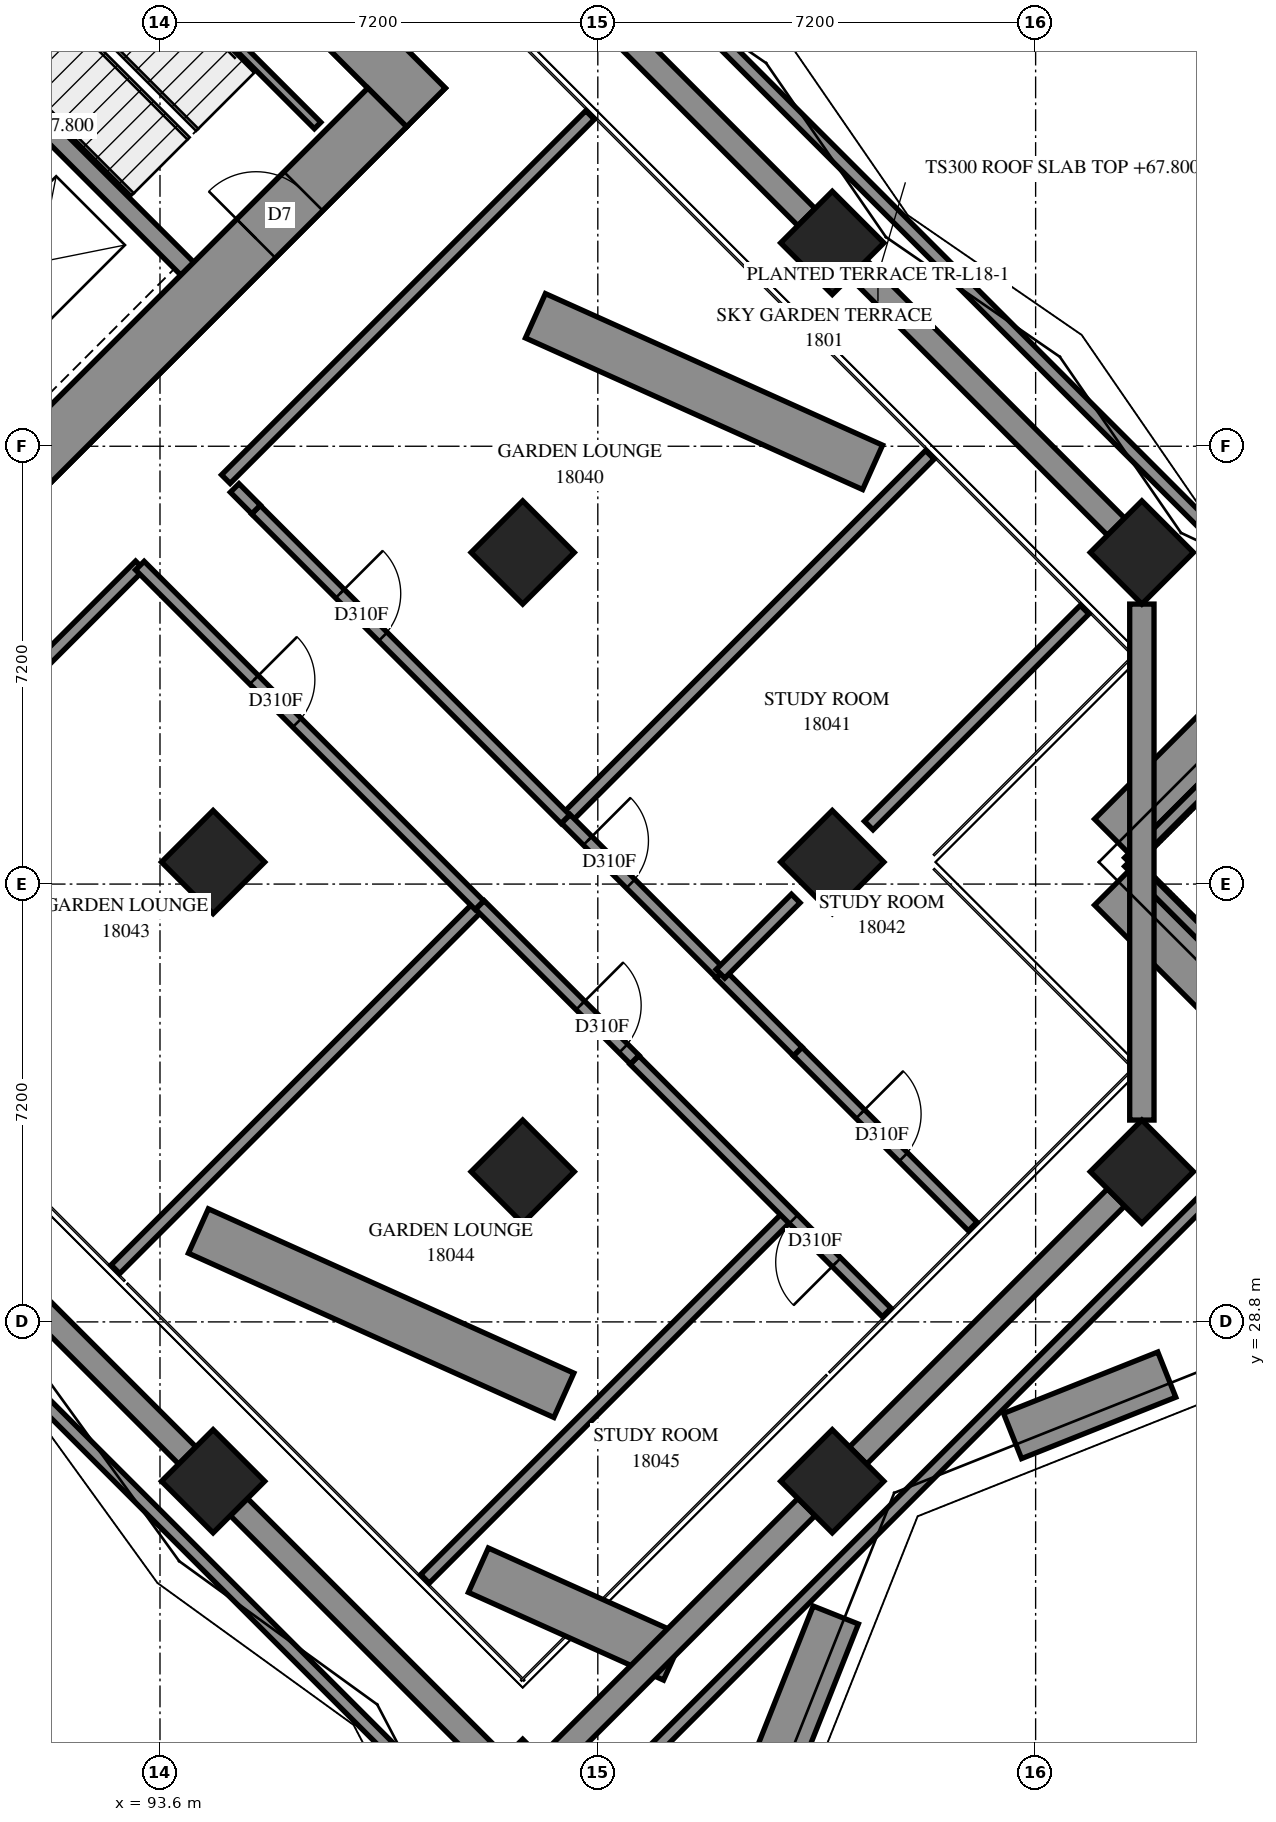
"""IFC4 building model, lengths in metres.
Left out: names, types, materials, properties, quantities, classifications, styles, units other than length and angle.
Written with IfcOpenShell. Run it as: python <this file> out.ifc"""

import sys

from ifc_helpers import new_model, si_unit, direction, frame, frame_2d, origin, origin_2d, place, context, subcontext, project, spatial, polyline, rectangle, outline, extrude, element, fill, save


model = new_model("IFC4")
c1 = context("Model", 3, precision=1e-05, world=origin(), true_north=direction((0.0, 1.0)))
c2 = subcontext(c1, "Body", "Model", "MODEL_VIEW")
j1 = project(units=[si_unit("LENGTHUNIT", "METRE"), si_unit("PLANEANGLEUNIT", "RADIAN")], contexts=[c1])
p1 = place(None, origin())
s1 = spatial("IfcSite", under=j1, at=p1, CompositionType="ELEMENT")
p2 = place(p1, origin())
s2 = spatial("IfcBuilding", under=s1, at=p2, CompositionType="ELEMENT")
p3 = place(p2, frame((0.0, 0.0, 67.8)))
s3 = spatial("IfcBuildingStorey", under=s2, at=p3, CompositionType="ELEMENT", Elevation=67.8)
for number, where, z_axis, x_axis in (
    (1, (104.656, 46.544, 0.0), (0.0, 0.0, 1.0), (0.707, -0.707, 0.0)),
    (2, (99.565, 41.453, 0.0), (0.0, 0.0, 1.0), (0.707, -0.707, 0.0)),
    (3, (94.474, 36.362, 0.0), (0.0, 0.0, 1.0), (0.707, -0.707, 0.0)),
    (4, (109.747, 41.453, 0.0), (0.0, 0.0, 1.0), (0.707, -0.707, 0.0)),
    (5, (104.656, 36.362, 0.0), (0.0, 0.0, 1.0), (0.707, -0.707, 0.0)),
    (6, (99.565, 31.271, 0.0), (0.0, 0.0, 1.0), (0.707, -0.707, 0.0)),
    (7, (94.474, 26.18, 0.0), (0.0, 0.0, 1.0), (0.707, -0.707, 0.0)),
    (8, (109.747, 31.271, 0.0), (0.0, 0.0, 1.0), (0.707, -0.707, 0.0)),
    (9, (104.656, 26.18, 0.0), (0.0, 0.0, 1.0), (0.707, -0.707, 0.0)),
    (10, (99.565, 21.088, 0.0), (0.0, 0.0, 1.0), (0.707, -0.707, 0.0)),
):
    element("IfcColumn", number, at=place(p3, frame(where, z_axis=z_axis, x_axis=x_axis)), inside=s3, PredefinedType="COLUMN", context=c2, shape_type="SweptSolid", body=[
        extrude(rectangle(XDim=1.2, YDim=1.2, at=origin_2d()), origin(), (0.0, 0.0, 1.0), 3.9),
    ])
p4 = place(p3, frame((86.519, 60.227, -0.3), z_axis=(0.0, 0.0, 1.0), x_axis=(0.7071036948, -0.7071098676, 0.0)))
e11 = element("IfcWall", 11, at=p4, inside=s3, PredefinedType="SHEAR", context=c2, shape_type="SweptSolid", body=[
    extrude(rectangle(XDim=16.2, YDim=0.9, at=frame_2d((8.1, 0.0))), origin(), (0.0, 0.0, 1.0), 3.5),
])
p5 = place(p4, frame((10.9, 0.0, 0.3)))
e12 = element("IfcOpeningElement", 12, at=p5, cuts=e11, PredefinedType="OPENING", context=c2, shape_type="SweptSolid", body=[
    extrude(rectangle(XDim=0.8, YDim=2.1, at=frame_2d((0.4, 1.05))), frame((0.0, 0.46, 0.0), z_axis=(0.0, -1.0, 0.0), x_axis=(1.0, 0.0, 0.0)), (0.0, 0.0, 1.0), 0.92),
])
p6 = place(p3, frame((87.155, 38.589, -0.3), z_axis=(0.0, 0.0, 1.0), x_axis=(0.7071067812, 0.7071067812, 0.0)))
e13 = element("IfcWall", 13, at=p6, inside=s3, PredefinedType="SHEAR", context=c2, shape_type="SweptSolid", body=[
    extrude(rectangle(XDim=14.4, YDim=0.9, at=frame_2d((7.2, 0.0))), origin(), (0.0, 0.0, 1.0), 3.5),
])
p7 = place(p6, frame((4.55, 0.0, 0.3)))
e14 = element("IfcOpeningElement", 14, at=p7, cuts=e13, PredefinedType="OPENING", context=c2, shape_type="SweptSolid", body=[
    extrude(rectangle(XDim=1.1, YDim=2.1, at=frame_2d((0.55, 1.05))), frame((0.0, 0.46, 0.0), z_axis=(0.0, -1.0, 0.0), x_axis=(1.0, 0.0, 0.0)), (0.0, 0.0, 1.0), 0.92),
])
p8 = place(p6, frame((11.35, 0.0, 0.3)))
e15 = element("IfcOpeningElement", 15, at=p8, cuts=e13, PredefinedType="OPENING", context=c2, shape_type="SweptSolid", body=[
    extrude(rectangle(XDim=1.1, YDim=2.1, at=frame_2d((0.55, 1.05))), frame((0.0, 0.46, 0.0), z_axis=(0.0, -1.0, 0.0), x_axis=(1.0, 0.0, 0.0)), (0.0, 0.0, 1.0), 0.92),
])
p9 = place(p3, frame((88.958, 51.211, 0.0), z_axis=(0.0, 0.0, 1.0), x_axis=(0.7070998367, -0.7071137256, 0.0)))
e16 = element("IfcWall", 16, at=p9, inside=s3, PredefinedType="SOLIDWALL", context=c2, shape_type="SweptSolid", body=[
    extrude(rectangle(XDim=7.2, YDim=0.3, at=frame_2d((3.6, 0.0))), origin(), (0.0, 0.0, 1.0), 3.9),
])
p10 = place(p3, frame((103.73, 21.506, 0.0), z_axis=(0.0, 0.0, 1.0), x_axis=(0.3696998756, 0.9291512266, 0.0)))
e17 = element("IfcWall", 17, at=p10, inside=s3, PredefinedType="SOLIDWALL", context=c2, shape_type="SweptSolid", body=[
    extrude(rectangle(XDim=2.662, YDim=0.8, at=frame_2d((1.331, 0.0))), origin(), (0.0, 0.0, 1.0), 0.65),
])
p11 = place(p3, frame((107.621, 26.924, 0.0), z_axis=(0.0, 0.0, 1.0), x_axis=(0.9291396377, 0.3697290003, 0.0)))
e18 = element("IfcWall", 18, at=p11, inside=s3, PredefinedType="SOLIDWALL", context=c2, shape_type="SweptSolid", body=[
    extrude(rectangle(XDim=2.73, YDim=0.8, at=frame_2d((1.365, 0.0))), origin(), (0.0, 0.0, 1.0), 0.65),
])
p12 = place(p3, frame((111.965, 33.224, 0.0), z_axis=(0.0, 0.0, 1.0), x_axis=(-0.7070937504, 0.7071198117, 0.0)))
e19 = element("IfcWall", 19, at=p12, inside=s3, PredefinedType="SOLIDWALL", context=c2, shape_type="SweptSolid", body=[
    extrude(rectangle(XDim=3.837, YDim=0.8, at=frame_2d((1.919, 0.0))), origin(), (0.0, 0.0, 1.0), 0.65),
])
p13 = place(p3, frame((109.252, 36.786, 0.0), z_axis=(0.0, 0.0, 1.0), x_axis=(0.7070958037, 0.7071177585, 0.0)))
e20 = element("IfcWall", 20, at=p13, inside=s3, PredefinedType="SOLIDWALL", context=c2, shape_type="SweptSolid", body=[
    extrude(rectangle(XDim=4.555, YDim=0.8, at=frame_2d((2.277, 0.0))), origin(), (0.0, 0.0, 1.0), 0.65),
])
p14 = place(p3, frame((105.319, 42.853, 0.0), z_axis=(0.0, 0.0, 1.0), x_axis=(-0.9121070138, 0.4099521866, 0.0)))
e21 = element("IfcWall", 21, at=p14, inside=s3, PredefinedType="SOLIDWALL", context=c2, shape_type="SweptSolid", body=[
    extrude(rectangle(XDim=6.079, YDim=0.8, at=frame_2d((3.039, 0.0))), origin(), (0.0, 0.0, 1.0), 0.65),
])
p15 = place(p3, frame((100.242, 27.593, 0.0), z_axis=(0.0, 0.0, 1.0), x_axis=(-0.9121025807, 0.4099620498, 0.0)))
e22 = element("IfcWall", 22, at=p15, inside=s3, PredefinedType="SOLIDWALL", context=c2, shape_type="SweptSolid", body=[
    extrude(rectangle(XDim=6.589, YDim=0.8, at=frame_2d((3.295, 0.0))), origin(), (0.0, 0.0, 1.0), 0.65),
])
p16 = place(p3, frame((102.045, 23.274, 0.0), z_axis=(0.0, 0.0, 1.0), x_axis=(-0.9121017012, 0.4099640067, 0.0)))
e23 = element("IfcWall", 23, at=p16, inside=s3, PredefinedType="SOLIDWALL", context=c2, shape_type="SweptSolid", body=[
    extrude(rectangle(XDim=3.518, YDim=0.8, at=frame_2d((1.759, 0.0))), origin(), (0.0, 0.0, 1.0), 0.65),
])
p17 = place(p3, frame((112.929, 32.968, 0.0), z_axis=(0.0, 0.0, 1.0), x_axis=(-0.7071067812, 0.7071067812, 0.0)))
e24 = element("IfcWall", 24, at=p17, inside=s3, PredefinedType="SOLIDWALL", context=c2, shape_type="SweptSolid", body=[
    extrude(outline(polyline([(-0.1, -0.1), (4.7, -0.1), (4.9, 0.1), (0.1, 0.1), (-0.1, -0.1)])), origin(), (0.0, 0.0, 1.0), 4.2),
])
p18 = place(p3, frame((109.535, 36.362, 0.0), z_axis=(0.0, 0.0, 1.0), x_axis=(0.7071067812, 0.7071067812, 0.0)))
e25 = element("IfcWall", 25, at=p18, inside=s3, PredefinedType="SOLIDWALL", context=c2, shape_type="SweptSolid", body=[
    extrude(outline(polyline([(0.1, -0.1), (4.9, -0.1), (4.7, 0.1), (-0.1, 0.1), (0.1, -0.1)])), origin(), (0.0, 0.0, 1.0), 4.2),
])
p19 = place(p3, frame((112.929, 39.756, 0.0), z_axis=(0.0, 0.0, 1.0), x_axis=(-0.7071067812, 0.7071067812, 0.0)))
e26 = element("IfcWall", 26, at=p19, inside=s3, PredefinedType="SOLIDWALL", context=c2, shape_type="SweptSolid", body=[
    extrude(outline(polyline([(-0.1, -0.1), (47.126, -0.1), (47.044, 0.1), (0.1, 0.1), (-0.1, -0.1)])), origin(), (0.0, 0.0, 1.0), 4.2),
])
p20 = place(p3, frame((77.018, 42.15, 0.0), z_axis=(0.0, 0.0, 1.0), x_axis=(0.7071067812, -0.7071067812, 0.0)))
e27 = element("IfcWall", 27, at=p20, inside=s3, PredefinedType="SOLIDWALL", context=c2, shape_type="SweptSolid", body=[
    extrude(outline(polyline([(0.041, -0.1), (31.986, -0.1), (31.786, 0.1), (-0.041, 0.1), (0.041, -0.1)])), origin(), (0.0, 0.0, 1.0), 4.2),
])
p21 = place(p3, frame((99.565, 19.603, 0.0), z_axis=(0.0, 0.0, 1.0), x_axis=(0.7071067812, 0.7071067812, 0.0)))
e28 = element("IfcWall", 28, at=p21, inside=s3, PredefinedType="SOLIDWALL", context=c2, shape_type="SweptSolid", body=[
    extrude(outline(polyline([(-0.1, -0.1), (19.0, -0.1), (18.8, 0.1), (0.1, 0.1), (-0.1, -0.1)])), origin(), (0.0, 0.0, 1.0), 4.2),
])
p22 = place(p3, frame((91.313, 53.354, 0.0), z_axis=(0.0, 0.0, 1.0), x_axis=(0.7071140275, -0.7070995348, 0.0)))
e29 = element("IfcWall", 29, at=p22, inside=s3, PredefinedType="PARTITIONING", context=c2, shape_type="SweptSolid", body=[
    extrude(rectangle(XDim=6.9, YDim=0.15, at=frame_2d((3.45, 0.0))), origin(), (0.0, 0.0, 1.0), 3.9),
])
for number, where, z_axis, x_axis in (
    (30, (100.271, 37.069, 0.0), (0.0, 0.0, 1.0), (0.707, 0.707, 0.0)),
    (31, (92.867, 29.665, 0.0), (0.0, 0.0, 1.0), (0.707, 0.707, 0.0)),
    (32, (97.958, 24.574, 0.0), (0.0, 0.0, 1.0), (0.707, 0.707, 0.0)),
):
    element("IfcWall", number, at=place(p3, frame(where, z_axis=z_axis, x_axis=x_axis)), inside=s3, PredefinedType="PARTITIONING", context=c2, shape_type="SweptSolid", body=[
        extrude(rectangle(XDim=8.471, YDim=0.2, at=frame_2d((4.236, 0.0))), origin(), (0.0, 0.0, 1.0), 3.9),
    ])
p23 = place(p3, frame((94.683, 42.659, 0.0), z_axis=(0.0, 0.0, 1.0), x_axis=(0.7072248389, 0.7069887037, 0.0)))
e33 = element("IfcWall", 33, at=p23, inside=s3, PredefinedType="PARTITIONING", context=c2, shape_type="SweptSolid", body=[
    extrude(rectangle(XDim=8.47, YDim=0.2, at=frame_2d((4.235, 0.0))), origin(), (0.0, 0.0, 1.0), 3.9),
])
p24 = place(p3, frame((87.281, 35.252, 0.0), z_axis=(0.0, 0.0, 1.0), x_axis=(0.7071067812, 0.7071067812, 0.0)))
e34 = element("IfcWall", 34, at=p24, inside=s3, PredefinedType="PARTITIONING", context=c2, shape_type="SweptSolid", body=[
    extrude(rectangle(XDim=8.468, YDim=0.2, at=frame_2d((4.234, 0.0))), origin(), (0.0, 0.0, 1.0), 3.9),
])
p25 = place(p3, frame((93.269, 41.237, 0.0), z_axis=(0.0, 0.0, 1.0), x_axis=(0.7071067812, -0.7071067812, 0.0)))
e35 = element("IfcWall", 35, at=p25, inside=s3, PredefinedType="PARTITIONING", context=c2, shape_type="SweptSolid", body=[
    extrude(rectangle(XDim=7.9, YDim=0.2, at=frame_2d((3.95, 0.0))), origin(), (0.0, 0.0, 1.0), 3.9),
])
p26 = place(p25, frame((2.656, 0.0, 0.0)))
e36 = element("IfcOpeningElement", 36, at=p26, cuts=e35, PredefinedType="OPENING", context=c2, shape_type="SweptSolid", body=[
    extrude(rectangle(XDim=1.0, YDim=2.1, at=frame_2d((0.5, 1.05))), frame((0.0, 0.11, 0.0), z_axis=(0.0, -1.0, 0.0), x_axis=(1.0, 0.0, 0.0)), (0.0, 0.0, 1.0), 0.22),
])
p27 = place(p3, frame((95.177, 42.157, 0.0), z_axis=(0.0, 0.0, 1.0), x_axis=(0.7071067812, -0.7071067812, 0.0)))
e37 = element("IfcWall", 37, at=p27, inside=s3, PredefinedType="PARTITIONING", context=c2, shape_type="SweptSolid", body=[
    extrude(rectangle(XDim=7.201, YDim=0.2, at=frame_2d((3.601, 0.0))), origin(), (0.0, 0.0, 1.0), 3.9),
])
p28 = place(p27, frame((1.954, 0.0, 0.0)))
e38 = element("IfcOpeningElement", 38, at=p28, cuts=e37, PredefinedType="OPENING", context=c2, shape_type="SweptSolid", body=[
    extrude(rectangle(XDim=1.0, YDim=2.1, at=frame_2d((0.5, 1.05))), frame((0.0, 0.11, 0.0), z_axis=(0.0, -1.0, 0.0), x_axis=(1.0, 0.0, 0.0)), (0.0, 0.0, 1.0), 0.22),
])
p29 = place(p3, frame((105.551, 28.955, 0.0), z_axis=(0.0, 0.0, 1.0), x_axis=(-0.7068512158, 0.7073622542, 0.0)))
e39 = element("IfcWall", 39, at=p29, inside=s3, PredefinedType="PARTITIONING", context=c2, shape_type="SweptSolid", body=[
    extrude(rectangle(XDim=5.87, YDim=0.2, at=frame_2d((2.935, 0.0))), origin(), (0.0, 0.0, 1.0), 3.9),
])
p30 = place(p29, frame((1.168, 0.0, 0.0)))
e40 = element("IfcOpeningElement", 40, at=p30, cuts=e39, PredefinedType="OPENING", context=c2, shape_type="SweptSolid", body=[
    extrude(rectangle(XDim=1.0, YDim=2.1, at=frame_2d((0.5, 1.05))), frame((0.0, 0.11, 0.0), z_axis=(0.0, -1.0, 0.0), x_axis=(1.0, 0.0, 0.0)), (0.0, 0.0, 1.0), 0.22),
])
p31 = place(p3, frame((105.255, 36.963, 0.0), z_axis=(0.0, 0.0, 1.0), x_axis=(0.7071067812, 0.7071067812, 0.0)))
e41 = element("IfcWall", 41, at=p31, inside=s3, PredefinedType="PARTITIONING", context=c2, shape_type="SweptSolid", body=[
    extrude(rectangle(XDim=5.021, YDim=0.2, at=frame_2d((2.51, 0.0))), origin(), (0.0, 0.0, 1.0), 3.9),
])
p32 = place(p3, frame((104.087, 33.247, 0.0), z_axis=(0.0, 0.0, 1.0), x_axis=(0.7071067812, -0.7071067812, 0.0)))
e42 = element("IfcWall", 42, at=p32, inside=s3, PredefinedType="PARTITIONING", context=c2, shape_type="SweptSolid", body=[
    extrude(rectangle(XDim=4.07, YDim=0.2, at=frame_2d((2.035, 0.0))), origin(), (0.0, 0.0, 1.0), 3.9),
])
p33 = place(p32, frame((1.456, 0.0, 0.0)))
e43 = element("IfcOpeningElement", 43, at=p33, cuts=e42, PredefinedType="OPENING", context=c2, shape_type="SweptSolid", body=[
    extrude(rectangle(XDim=1.0, YDim=2.1, at=frame_2d((0.5, 1.05))), frame((0.0, 0.11, 0.0), z_axis=(0.0, -1.0, 0.0), x_axis=(1.0, 0.0, 0.0)), (0.0, 0.0, 1.0), 0.22),
])
p34 = place(p3, frame((98.86, 35.656, 0.0), z_axis=(0.0, 0.0, 1.0), x_axis=(0.7073845681, -0.7068288851, 0.0)))
e44 = element("IfcWall", 44, at=p34, inside=s3, PredefinedType="PARTITIONING", context=c2, shape_type="SweptSolid", body=[
    extrude(rectangle(XDim=3.599, YDim=0.2, at=frame_2d((1.8, 0.0))), origin(), (0.0, 0.0, 1.0), 3.9),
])
p35 = place(p34, frame((2.337, 0.0, 0.0)))
e45 = element("IfcOpeningElement", 45, at=p35, cuts=e44, PredefinedType="OPENING", context=c2, shape_type="SweptSolid", body=[
    extrude(rectangle(XDim=1.0, YDim=2.1, at=frame_2d((0.5, 1.05))), frame((0.0, 0.11, 0.0), z_axis=(0.0, -1.0, 0.0), x_axis=(1.0, 0.0, 0.0)), (0.0, 0.0, 1.0), 0.22),
])
p36 = place(p3, frame((100.275, 37.071, 0.0), z_axis=(0.0, 0.0, 1.0), x_axis=(0.7073845681, -0.7068288851, 0.0)))
e46 = element("IfcWall", 46, at=p36, inside=s3, PredefinedType="PARTITIONING", context=c2, shape_type="SweptSolid", body=[
    extrude(rectangle(XDim=3.599, YDim=0.2, at=frame_2d((1.8, 0.0))), origin(), (0.0, 0.0, 1.0), 3.9),
])
p37 = place(p36, frame((0.507, 0.0, 0.0)))
e47 = element("IfcOpeningElement", 47, at=p37, cuts=e46, PredefinedType="OPENING", context=c2, shape_type="SweptSolid", body=[
    extrude(rectangle(XDim=1.0, YDim=2.1, at=frame_2d((0.5, 1.05))), frame((0.0, 0.11, 0.0), z_axis=(0.0, -1.0, 0.0), x_axis=(1.0, 0.0, 0.0)), (0.0, 0.0, 1.0), 0.22),
])
p38 = place(p3, frame((102.816, 34.522, 0.0), z_axis=(0.0, 0.0, 1.0), x_axis=(0.7065510983, -0.7076620277, 0.0)))
e48 = element("IfcWall", 48, at=p38, inside=s3, PredefinedType="PARTITIONING", context=c2, shape_type="SweptSolid", body=[
    extrude(rectangle(XDim=1.8, YDim=0.2, at=frame_2d((0.9, 0.0))), origin(), (0.0, 0.0, 1.0), 3.9),
])
p39 = place(p3, frame((102.817, 34.525, 0.0), z_axis=(0.0, 0.0, 1.0), x_axis=(0.7071067812, 0.7071067812, 0.0)))
e49 = element("IfcWall", 49, at=p39, inside=s3, PredefinedType="PARTITIONING", context=c2, shape_type="SweptSolid", body=[
    extrude(rectangle(XDim=1.751, YDim=0.2, at=frame_2d((0.875, 0.0))), origin(), (0.0, 0.0, 1.0), 3.9),
])
p40 = place(p3, frame((94.828, 42.514, 0.0), z_axis=(0.0, 0.0, 1.0), x_axis=(0.7051008166, -0.7091070712, 0.0)))
e50 = element("IfcWall", 50, at=p40, inside=s3, PredefinedType="PARTITIONING", context=c2, shape_type="SweptSolid", body=[
    extrude(rectangle(XDim=0.499, YDim=0.2, at=frame_2d((0.25, 0.0))), origin(), (0.0, 0.0, 1.0), 3.9),
])
p41 = place(p8, origin())
e51 = element("IfcDoor", 51, at=p41, inside=s3, OperationType="SINGLE_SWING_RIGHT", PredefinedType="DOOR", context=c2, shape_type="SweptSolid", body=[
    extrude(rectangle(XDim=1.1, YDim=2.1, at=frame_2d((0.55, 1.05))), frame((0.0, 0.025, 0.0), z_axis=(0.0, -1.0, 0.0), x_axis=(1.0, 0.0, 0.0)), (0.0, 0.0, 1.0), 0.05),
])
fill(e15, e51)
p42 = place(p28, origin())
e52 = element("IfcDoor", 52, at=p42, inside=s3, OperationType="SINGLE_SWING_RIGHT", PredefinedType="DOOR", context=c2, shape_type="SweptSolid", body=[
    extrude(rectangle(XDim=1.0, YDim=2.1, at=frame_2d((0.5, 1.05))), frame((0.0, 0.025, 0.0), z_axis=(0.0, -1.0, 0.0), x_axis=(1.0, 0.0, 0.0)), (0.0, 0.0, 1.0), 0.05),
])
fill(e38, e52)
p43 = place(p37, origin())
e53 = element("IfcDoor", 53, at=p43, inside=s3, OperationType="SINGLE_SWING_RIGHT", PredefinedType="DOOR", context=c2, shape_type="SweptSolid", body=[
    extrude(rectangle(XDim=1.0, YDim=2.1, at=frame_2d((0.5, 1.05))), frame((0.0, 0.025, 0.0), z_axis=(0.0, -1.0, 0.0), x_axis=(1.0, 0.0, 0.0)), (0.0, 0.0, 1.0), 0.05),
])
fill(e47, e53)
p44 = place(p33, origin())
e54 = element("IfcDoor", 54, at=p44, inside=s3, OperationType="SINGLE_SWING_LEFT", PredefinedType="DOOR", context=c2, shape_type="SweptSolid", body=[
    extrude(rectangle(XDim=1.0, YDim=2.1, at=frame_2d((0.5, 1.05))), frame((0.0, 0.025, 0.0), z_axis=(0.0, -1.0, 0.0), x_axis=(1.0, 0.0, 0.0)), (0.0, 0.0, 1.0), 0.05),
])
fill(e43, e54)
p45 = place(p26, origin())
e55 = element("IfcDoor", 55, at=p45, inside=s3, OperationType="SINGLE_SWING_LEFT", PredefinedType="DOOR", context=c2, shape_type="SweptSolid", body=[
    extrude(rectangle(XDim=1.0, YDim=2.1, at=frame_2d((0.5, 1.05))), frame((0.0, 0.025, 0.0), z_axis=(0.0, -1.0, 0.0), x_axis=(1.0, 0.0, 0.0)), (0.0, 0.0, 1.0), 0.05),
])
fill(e36, e55)
p46 = place(p35, origin())
e56 = element("IfcDoor", 56, at=p46, inside=s3, OperationType="SINGLE_SWING_LEFT", PredefinedType="DOOR", context=c2, shape_type="SweptSolid", body=[
    extrude(rectangle(XDim=1.0, YDim=2.1, at=frame_2d((0.5, 1.05))), frame((0.0, 0.025, 0.0), z_axis=(0.0, -1.0, 0.0), x_axis=(1.0, 0.0, 0.0)), (0.0, 0.0, 1.0), 0.05),
])
fill(e45, e56)
p47 = place(p30, origin())
e57 = element("IfcDoor", 57, at=p47, inside=s3, OperationType="SINGLE_SWING_LEFT", PredefinedType="DOOR", context=c2, shape_type="SweptSolid", body=[
    extrude(rectangle(XDim=1.0, YDim=2.1, at=frame_2d((0.5, 1.05))), frame((0.0, 0.025, 0.0), z_axis=(0.0, -1.0, 0.0), x_axis=(1.0, 0.0, 0.0)), (0.0, 0.0, 1.0), 0.05),
])
fill(e40, e57)
save(model, sys.argv[1])
